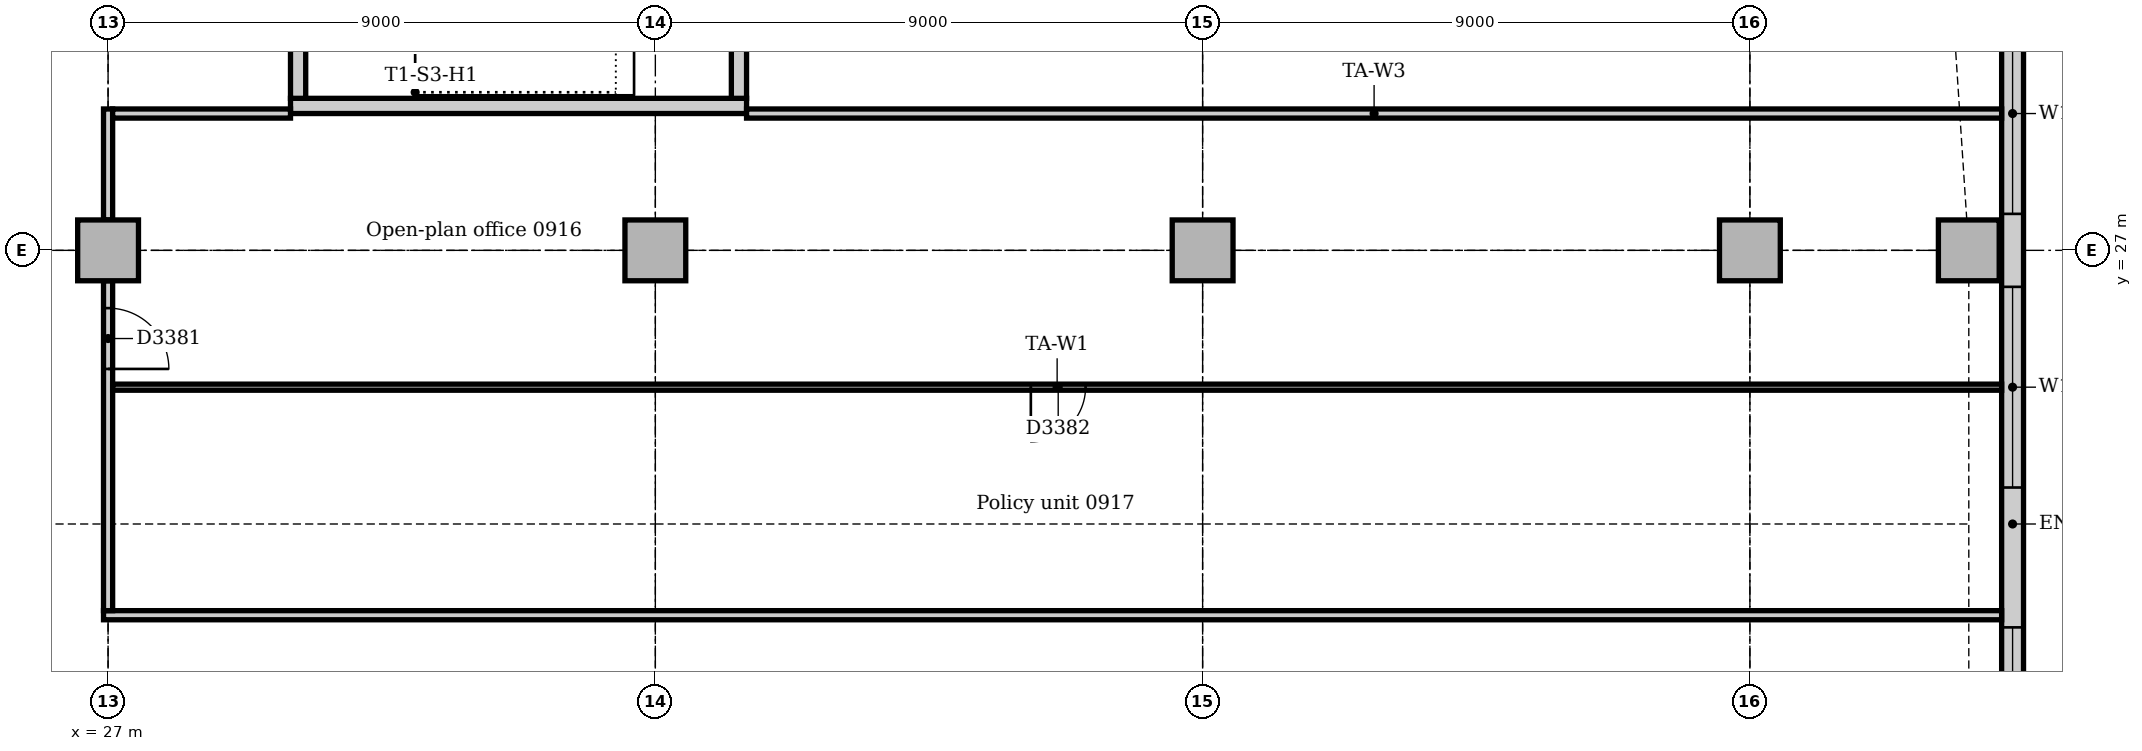
"""IFC4 building model, lengths in metres.
Left out: names, types, materials, properties, quantities, classifications, styles, units other than length and angle.
Written with IfcOpenShell. Run it as: python <this file> out.ifc"""

import sys

from ifc_helpers import new_model, si_unit, direction, frame, frame_2d, origin, origin_2d, place, context, subcontext, project, spatial, rectangle, extrude, element, fill, save


model = new_model("IFC4")
c1 = context("Model", 3, precision=1e-05, world=origin(), true_north=direction((0.0, 1.0)))
c2 = subcontext(c1, "Body", "Model", "MODEL_VIEW")
j1 = project(units=[si_unit("LENGTHUNIT", "METRE"), si_unit("PLANEANGLEUNIT", "RADIAN")], contexts=[c1])
p1 = place(None, origin())
s1 = spatial("IfcSite", under=j1, at=p1, CompositionType="ELEMENT")
p2 = place(p1, origin())
s2 = spatial("IfcBuilding", under=s1, at=p2, CompositionType="ELEMENT")
p3 = place(p2, frame((0.0, 0.0, 42.0)))
s3 = spatial("IfcBuildingStorey", under=s2, at=p3, CompositionType="ELEMENT", Elevation=42.0)
p4 = place(p3, frame((30.0, 29.375, 0.0), z_axis=(0.0, 0.0, 1.0), x_axis=(1.0, 0.0, 0.0)))
e1 = element("IfcWall", 1, at=p4, inside=s3, PredefinedType="SOLIDWALL", context=c2, shape_type="SweptSolid", body=[
    extrude(rectangle(XDim=7.5, YDim=0.25, at=frame_2d((3.75, 0.0))), origin(), (0.0, 0.0, 1.0), 4.0),
])
p5 = place(p3, frame((37.375, 29.5, 0.0), z_axis=(0.0, 0.0, 1.0), x_axis=(0.0, 1.0, 0.0)))
e2 = element("IfcWall", 2, at=p5, inside=s3, PredefinedType="SOLIDWALL", context=c2, shape_type="SweptSolid", body=[
    extrude(rectangle(XDim=4.0, YDim=0.25, at=frame_2d((2.0, 0.0))), origin(), (0.0, 0.0, 1.0), 4.0),
])
p6 = place(p3, frame((30.125, 33.5, 0.0), z_axis=(0.0, 0.0, 1.0), x_axis=(0.0, -1.0, 0.0)))
e3 = element("IfcWall", 3, at=p6, inside=s3, PredefinedType="SOLIDWALL", context=c2, shape_type="SweptSolid", body=[
    extrude(rectangle(XDim=4.0, YDim=0.25, at=frame_2d((2.0, 0.0))), origin(), (0.0, 0.0, 1.0), 4.0),
])
p7 = place(p6, frame((1.5, 0.0, 0.0)))
e4 = element("IfcOpeningElement", 4, at=p7, cuts=e3, PredefinedType="OPENING", context=c2, shape_type="SweptSolid", body=[
    extrude(rectangle(XDim=1.0, YDim=2.1, at=frame_2d((0.5, 1.05))), frame((0.0, 0.135, 0.0), z_axis=(0.0, -1.0, 0.0), x_axis=(1.0, 0.0, 0.0)), (0.0, 0.0, 1.0), 0.27),
])
for number, where, z_axis, x_axis in (
    (5, (57.6, 27.0, 0.0), (0.0, 0.0, 1.0), (1.0, 0.0, 0.0)),
    (6, (27.0, 27.0, 0.0), (0.0, 0.0, 1.0), (1.0, 0.0, 0.0)),
    (7, (36.0, 27.0, 0.0), (0.0, 0.0, 1.0), (1.0, 0.0, 0.0)),
    (8, (45.0, 27.0, 0.0), (0.0, 0.0, 1.0), (1.0, 0.0, 0.0)),
    (9, (54.0, 27.0, 0.0), (0.0, 0.0, 1.0), (1.0, 0.0, 0.0)),
):
    element("IfcColumn", number, at=place(p3, frame(where, z_axis=z_axis, x_axis=x_axis)), inside=s3, PredefinedType="COLUMN", context=c2, shape_type="SweptSolid", body=[
        extrude(rectangle(XDim=1.0, YDim=1.0, at=origin_2d()), origin(), (0.0, 0.0, 1.0), 3.7),
    ])
p8 = place(p3, frame((58.32, 10.243, 0.0), z_axis=(0.0, 0.0, 1.0), x_axis=(0.0, 1.0, 0.0)))
e10 = element("IfcWall", 10, at=p8, inside=s3, PredefinedType="STANDARD", context=c2, shape_type="SweptSolid", body=[
    extrude(rectangle(XDim=24.515, YDim=0.36, at=frame_2d((12.257, 0.0))), origin(), (0.0, 0.0, 1.0), 3.7),
])
p9 = place(p8, frame((3.857, 0.0, 0.9)))
e11 = element("IfcOpeningElement", 11, at=p9, cuts=e10, PredefinedType="OPENING", context=c2, shape_type="SweptSolid", body=[
    extrude(rectangle(XDim=3.3, YDim=1.6, at=frame_2d((1.65, 0.8))), frame((0.0, 0.19, 0.0), z_axis=(0.0, -1.0, 0.0), x_axis=(1.0, 0.0, 0.0)), (0.0, 0.0, 1.0), 0.38),
])
p10 = place(p8, frame((8.757, 0.0, 0.9)))
e12 = element("IfcOpeningElement", 12, at=p10, cuts=e10, PredefinedType="OPENING", context=c2, shape_type="SweptSolid", body=[
    extrude(rectangle(XDim=1.8, YDim=1.6, at=frame_2d((0.9, 0.8))), frame((0.0, 0.19, 0.0), z_axis=(0.0, -1.0, 0.0), x_axis=(1.0, 0.0, 0.0)), (0.0, 0.0, 1.0), 0.38),
])
p11 = place(p8, frame((12.857, 0.0, 0.9)))
e13 = element("IfcOpeningElement", 13, at=p11, cuts=e10, PredefinedType="OPENING", context=c2, shape_type="SweptSolid", body=[
    extrude(rectangle(XDim=3.3, YDim=1.6, at=frame_2d((1.65, 0.8))), frame((0.0, 0.19, 0.0), z_axis=(0.0, -1.0, 0.0), x_axis=(1.0, 0.0, 0.0)), (0.0, 0.0, 1.0), 0.38),
])
p12 = place(p8, frame((17.357, 0.0, 0.9)))
e14 = element("IfcOpeningElement", 14, at=p12, cuts=e10, PredefinedType="OPENING", context=c2, shape_type="SweptSolid", body=[
    extrude(rectangle(XDim=3.3, YDim=1.6, at=frame_2d((1.65, 0.8))), frame((0.0, 0.19, 0.0), z_axis=(0.0, -1.0, 0.0), x_axis=(1.0, 0.0, 0.0)), (0.0, 0.0, 1.0), 0.38),
])
p13 = place(p3, frame((26.925, 21.0, 0.0), z_axis=(0.0, 0.0, 1.0), x_axis=(1.0, 0.0, 0.0)))
e15 = element("IfcWall", 15, at=p13, inside=s3, PredefinedType="PARTITIONING", context=c2, shape_type="SweptSolid", body=[
    extrude(rectangle(XDim=31.215, YDim=0.15, at=frame_2d((15.607, 0.0))), origin(), (0.0, 0.0, 1.0), 3.7),
])
p14 = place(p3, frame((27.0, 21.075, 0.0), z_axis=(0.0, 0.0, 1.0), x_axis=(0.0, 1.0, 0.0)))
e16 = element("IfcWall", 16, at=p14, inside=s3, PredefinedType="PARTITIONING", context=c2, shape_type="SweptSolid", body=[
    extrude(rectangle(XDim=5.425, YDim=0.15, at=frame_2d((2.712, 0.0))), origin(), (0.0, 0.0, 1.0), 3.008),
])
p15 = place(p14, frame((3.975, 0.0, 0.0)))
e17 = element("IfcOpeningElement", 17, at=p15, cuts=e16, PredefinedType="OPENING", context=c2, shape_type="SweptSolid", body=[
    extrude(rectangle(XDim=1.0, YDim=2.1, at=frame_2d((0.5, 1.05))), frame((0.0, 0.085, 0.0), z_axis=(0.0, -1.0, 0.0), x_axis=(1.0, 0.0, 0.0)), (0.0, 0.0, 1.0), 0.17),
])
p16 = place(p3, frame((27.0, 27.5, 0.0), z_axis=(0.0, 0.0, 1.0), x_axis=(0.0, 1.0, 0.0)))
e18 = element("IfcWall", 18, at=p16, inside=s3, PredefinedType="PARTITIONING", context=c2, shape_type="SweptSolid", body=[
    extrude(rectangle(XDim=1.825, YDim=0.15, at=frame_2d((0.912, 0.0))), origin(), (0.0, 0.0, 1.0), 3.008),
])
p17 = place(p3, frame((27.075, 29.25, 0.0), z_axis=(0.0, 0.0, 1.0), x_axis=(1.0, 0.0, 0.0)))
e19 = element("IfcWall", 19, at=p17, inside=s3, PredefinedType="PARTITIONING", context=c2, shape_type="SweptSolid", body=[
    extrude(rectangle(XDim=2.925, YDim=0.15, at=frame_2d((1.462, 0.0))), origin(), (0.0, 0.0, 1.0), 3.7),
])
p18 = place(p3, frame((37.5, 29.25, 0.0), z_axis=(0.0, 0.0, 1.0), x_axis=(1.0, 0.0, 0.0)))
e20 = element("IfcWall", 20, at=p18, inside=s3, PredefinedType="PARTITIONING", context=c2, shape_type="SweptSolid", body=[
    extrude(rectangle(XDim=20.64, YDim=0.15, at=frame_2d((10.32, 0.0))), origin(), (0.0, 0.0, 1.0), 3.7),
])
p19 = place(p3, frame((27.075, 24.75, 0.0), z_axis=(0.0, 0.0, 1.0), x_axis=(1.0, 0.0, 0.0)))
e21 = element("IfcWall", 21, at=p19, inside=s3, PredefinedType="PARTITIONING", context=c2, shape_type="SweptSolid", body=[
    extrude(rectangle(XDim=31.065, YDim=0.1, at=frame_2d((15.533, 0.0))), origin(), (0.0, 0.0, 1.0), 3.7),
])
p20 = place(p19, frame((15.1, 0.0, 0.0)))
e22 = element("IfcOpeningElement", 22, at=p20, cuts=e21, PredefinedType="OPENING", context=c2, shape_type="SweptSolid", body=[
    extrude(rectangle(XDim=0.9, YDim=2.1, at=frame_2d((0.45, 1.05))), frame((0.0, 0.06, 0.0), z_axis=(0.0, -1.0, 0.0), x_axis=(1.0, 0.0, 0.0)), (0.0, 0.0, 1.0), 0.12),
])
p21 = place(p10, origin())
e23 = element("IfcWindow", 23, at=p21, inside=s3, PartitioningType="SINGLE_PANEL", PredefinedType="WINDOW", context=c2, shape_type="SweptSolid", body=[
    extrude(rectangle(XDim=1.8, YDim=1.6, at=frame_2d((0.9, 0.8))), frame((0.0, 0.13, 0.0), z_axis=(0.0, -1.0, 0.0), x_axis=(1.0, 0.0, 0.0)), (0.0, 0.0, 1.0), 0.06),
])
fill(e12, e23)
p22 = place(p11, origin())
e24 = element("IfcWindow", 24, at=p22, inside=s3, PartitioningType="SINGLE_PANEL", PredefinedType="WINDOW", context=c2, shape_type="SweptSolid", body=[
    extrude(rectangle(XDim=3.3, YDim=1.6, at=frame_2d((1.65, 0.8))), frame((0.0, 0.13, 0.0), z_axis=(0.0, -1.0, 0.0), x_axis=(1.0, 0.0, 0.0)), (0.0, 0.0, 1.0), 0.06),
])
fill(e13, e24)
p23 = place(p12, origin())
e25 = element("IfcWindow", 25, at=p23, inside=s3, PartitioningType="SINGLE_PANEL", PredefinedType="WINDOW", context=c2, shape_type="SweptSolid", body=[
    extrude(rectangle(XDim=3.3, YDim=1.6, at=frame_2d((1.65, 0.8))), frame((0.0, 0.13, 0.0), z_axis=(0.0, -1.0, 0.0), x_axis=(1.0, 0.0, 0.0)), (0.0, 0.0, 1.0), 0.06),
])
fill(e14, e25)
p24 = place(p15, frame((1.0, 0.0, 0.0), z_axis=(0.0, 0.0, 1.0), x_axis=(-1.0, 0.0, 0.0)))
e26 = element("IfcDoor", 26, at=p24, inside=s3, OperationType="SINGLE_SWING_RIGHT", PredefinedType="DOOR", context=c2, shape_type="SweptSolid", body=[
    extrude(rectangle(XDim=1.0, YDim=2.1, at=frame_2d((0.5, 1.05))), frame((0.0, 0.025, 0.0), z_axis=(0.0, -1.0, 0.0), x_axis=(1.0, 0.0, 0.0)), (0.0, 0.0, 1.0), 0.05),
])
fill(e17, e26)
p25 = place(p20, frame((0.9, 0.0, 0.0), z_axis=(0.0, 0.0, 1.0), x_axis=(-1.0, 0.0, 0.0)))
e27 = element("IfcDoor", 27, at=p25, inside=s3, OperationType="SINGLE_SWING_RIGHT", PredefinedType="DOOR", context=c2, shape_type="SweptSolid", body=[
    extrude(rectangle(XDim=0.9, YDim=2.1, at=frame_2d((0.45, 1.05))), frame((0.0, 0.025, 0.0), z_axis=(0.0, -1.0, 0.0), x_axis=(1.0, 0.0, 0.0)), (0.0, 0.0, 1.0), 0.05),
])
fill(e22, e27)
save(model, sys.argv[1])
